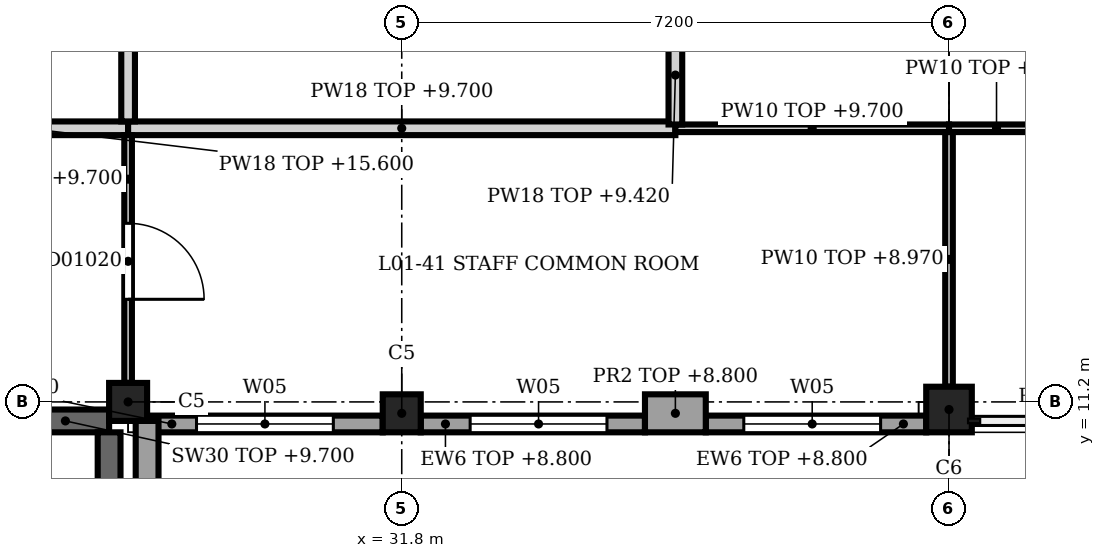
"""IFC4 building model, lengths in metres.
Left out: names, types, materials, properties, quantities, classifications, styles, units other than length and angle.
Written with IfcOpenShell. Run it as: python <this file> out.ifc"""

import sys

from ifc_helpers import new_model, si_unit, direction, frame, frame_2d, origin, origin_2d, place, context, subcontext, project, spatial, rectangle, extrude, element, fill, save


model = new_model("IFC4")
c1 = context("Model", 3, precision=1e-05, world=origin(), true_north=direction((0.0, 1.0)))
c2 = subcontext(c1, "Body", "Model", "MODEL_VIEW")
j1 = project(units=[si_unit("LENGTHUNIT", "METRE"), si_unit("PLANEANGLEUNIT", "RADIAN")], contexts=[c1])
p1 = place(None, origin())
s1 = spatial("IfcSite", under=j1, at=p1, CompositionType="ELEMENT")
p2 = place(p1, origin())
s2 = spatial("IfcBuilding", under=s1, at=p2, CompositionType="ELEMENT")
p3 = place(p2, frame((0.0, 0.0, 5.4)))
s3 = spatial("IfcBuildingStorey", under=s2, at=p3, CompositionType="ELEMENT", Elevation=5.4)
p4 = place(p3, frame((39.0, 11.1, 0.0), z_axis=(0.0, 0.0, 1.0), x_axis=(1.0, 0.0, 0.0)))
e1 = element("IfcColumn", 1, at=p4, inside=s3, PredefinedType="COLUMN", context=c2, shape_type="SweptSolid", body=[
    extrude(rectangle(XDim=0.6, YDim=0.6, at=origin_2d()), origin(), (0.0, 0.0, 1.0), 4.5),
])
for number, where, z_axis, x_axis in (
    (2, (28.2, 11.2, 0.0), (0.0, 0.0, 1.0), (1.0, 0.0, 0.0)),
    (3, (31.8, 11.05, 0.0), (0.0, 0.0, 1.0), (1.0, 0.0, 0.0)),
):
    element("IfcColumn", number, at=place(p3, frame(where, z_axis=z_axis, x_axis=x_axis)), inside=s3, PredefinedType="COLUMN", context=c2, shape_type="SweptSolid", body=[
        extrude(rectangle(XDim=0.5, YDim=0.5, at=origin_2d()), origin(), (0.0, 0.0, 1.0), 4.5),
    ])
p5 = place(p3, frame((28.45, 10.95, 0.0), z_axis=(0.0, 0.0, 1.0), x_axis=(0.0, -1.0, 0.0)))
e4 = element("IfcWall", 4, at=p5, inside=s3, PredefinedType="SOLIDWALL", context=c2, shape_type="SweptSolid", body=[
    extrude(rectangle(XDim=6.95, YDim=0.3, at=frame_2d((3.475, 0.0))), origin(), (0.0, 0.0, 1.0), 4.5),
])
p6 = place(p3, frame((35.8, 11.05, 0.0), z_axis=(0.0, 0.0, 1.0), x_axis=(-1.0, 0.0, 0.0)))
e5 = element("IfcWall", 5, at=p6, inside=s3, PredefinedType="SOLIDWALL", context=c2, shape_type="SweptSolid", body=[
    extrude(rectangle(XDim=0.8, YDim=0.5, at=frame_2d((0.4, 0.0))), origin(), (0.0, 0.0, 1.0), 3.4),
])
p7 = place(p3, frame((38.7, 10.91, 0.0), z_axis=(0.0, 0.0, 1.0), x_axis=(-1.0, 0.0, 0.0)))
e6 = element("IfcWall", 6, at=p7, inside=s3, PredefinedType="SOLIDWALL", context=c2, shape_type="SweptSolid", body=[
    extrude(rectangle(XDim=2.9, YDim=0.22, at=frame_2d((1.45, 0.0))), origin(), (0.0, 0.0, 1.0), 3.4),
])
p8 = place(p7, frame((0.6, 0.0, 0.9)))
e7 = element("IfcOpeningElement", 7, at=p8, cuts=e6, PredefinedType="OPENING", context=c2, shape_type="SweptSolid", body=[
    extrude(rectangle(XDim=1.8, YDim=2.4, at=frame_2d((0.9, 1.2))), frame((0.0, 0.12, 0.0), z_axis=(0.0, -1.0, 0.0), x_axis=(1.0, 0.0, 0.0)), (0.0, 0.0, 1.0), 0.24),
])
p9 = place(p3, frame((35.0, 10.91, 0.0), z_axis=(0.0, 0.0, 1.0), x_axis=(-1.0, 0.0, 0.0)))
e8 = element("IfcWall", 8, at=p9, inside=s3, PredefinedType="SOLIDWALL", context=c2, shape_type="SweptSolid", body=[
    extrude(rectangle(XDim=2.95, YDim=0.22, at=frame_2d((1.475, 0.0))), origin(), (0.0, 0.0, 1.0), 3.4),
])
p10 = place(p9, frame((0.5, 0.0, 0.9)))
e9 = element("IfcOpeningElement", 9, at=p10, cuts=e8, PredefinedType="OPENING", context=c2, shape_type="SweptSolid", body=[
    extrude(rectangle(XDim=1.8, YDim=2.4, at=frame_2d((0.9, 1.2))), frame((0.0, 0.12, 0.0), z_axis=(0.0, -1.0, 0.0), x_axis=(1.0, 0.0, 0.0)), (0.0, 0.0, 1.0), 0.24),
])
p11 = place(p3, frame((31.55, 10.91, 0.0), z_axis=(0.0, 0.0, 1.0), x_axis=(-1.0, 0.0, 0.0)))
e10 = element("IfcWall", 10, at=p11, inside=s3, PredefinedType="SOLIDWALL", context=c2, shape_type="SweptSolid", body=[
    extrude(rectangle(XDim=3.1, YDim=0.22, at=frame_2d((1.55, 0.0))), origin(), (0.0, 0.0, 1.0), 3.4),
])
p12 = place(p11, frame((0.65, 0.0, 0.9)))
e11 = element("IfcOpeningElement", 11, at=p12, cuts=e10, PredefinedType="OPENING", context=c2, shape_type="SweptSolid", body=[
    extrude(rectangle(XDim=1.8, YDim=2.4, at=frame_2d((0.9, 1.2))), frame((0.0, 0.12, 0.0), z_axis=(0.0, -1.0, 0.0), x_axis=(1.0, 0.0, 0.0)), (0.0, 0.0, 1.0), 0.24),
])
p13 = place(p3, frame((27.95, 10.95, 0.0), z_axis=(0.0, 0.0, 1.0), x_axis=(-1.0, 0.0, 0.0)))
e12 = element("IfcWall", 12, at=p13, inside=s3, PredefinedType="SHEAR", context=c2, shape_type="SweptSolid", body=[
    extrude(rectangle(XDim=3.0, YDim=0.3, at=frame_2d((1.5, 0.0))), origin(), (0.0, 0.0, 1.0), 4.3),
])
p14 = place(p13, frame((1.15, 0.0, 0.0)))
e13 = element("IfcOpeningElement", 13, at=p14, cuts=e12, PredefinedType="OPENING", context=c2, shape_type="SweptSolid", body=[
    extrude(rectangle(XDim=1.2, YDim=2.1, at=frame_2d((0.6, 1.05))), frame((0.0, 0.16, 0.0), z_axis=(0.0, -1.0, 0.0), x_axis=(1.0, 0.0, 0.0)), (0.0, 0.0, 1.0), 0.32),
])
p15 = place(p3, frame((27.95, 4.4, 0.0), z_axis=(0.0, 0.0, 1.0), x_axis=(0.0, 1.0, 0.0)))
e14 = element("IfcWall", 14, at=p15, inside=s3, PredefinedType="SHEAR", context=c2, shape_type="SweptSolid", body=[
    extrude(rectangle(XDim=6.4, YDim=0.3, at=frame_2d((3.2, 0.0))), origin(), (0.0, 0.0, 1.0), 4.3),
])
p16 = place(p3, frame((28.2, 14.8, 0.0), z_axis=(0.0, 0.0, 1.0), x_axis=(-1.0, 0.0, 0.0)))
e15 = element("IfcWall", 15, at=p16, inside=s3, PredefinedType="PARTITIONING", context=c2, shape_type="SweptSolid", body=[
    extrude(rectangle(XDim=7.2, YDim=0.18, at=frame_2d((3.6, 0.0))), origin(), (0.0, 0.0, 1.0), 10.2),
])
p17 = place(p16, frame((2.65, 0.0, 0.0)))
e16 = element("IfcOpeningElement", 16, at=p17, cuts=e15, PredefinedType="OPENING", context=c2, shape_type="SweptSolid", body=[
    extrude(rectangle(XDim=2.0, YDim=2.3, at=frame_2d((1.0, 1.15))), frame((0.0, 0.1, 0.0), z_axis=(0.0, -1.0, 0.0), x_axis=(1.0, 0.0, 0.0)), (0.0, 0.0, 1.0), 0.2),
])
p18 = place(p3, frame((28.2, 14.8, 0.0), z_axis=(0.0, 0.0, 1.0), x_axis=(1.0, 0.0, 0.0)))
e17 = element("IfcWall", 17, at=p18, inside=s3, PredefinedType="PARTITIONING", context=c2, shape_type="SweptSolid", body=[
    extrude(rectangle(XDim=7.2, YDim=0.18, at=frame_2d((3.6, 0.0))), origin(), (0.0, 0.0, 1.0), 4.3),
])
p19 = place(p3, frame((35.4, 14.8, 0.0), z_axis=(0.0, 0.0, 1.0), x_axis=(1.0, 0.0, 0.0)))
e18 = element("IfcWall", 18, at=p19, inside=s3, PredefinedType="PARTITIONING", context=c2, shape_type="SweptSolid", body=[
    extrude(rectangle(XDim=3.6, YDim=0.1, at=frame_2d((1.8, 0.0))), origin(), (0.0, 0.0, 1.0), 4.3),
])
p20 = place(p3, frame((41.975, 14.8, 0.0), z_axis=(0.0, 0.0, 1.0), x_axis=(-1.0, 0.0, 0.0)))
e19 = element("IfcWall", 19, at=p20, inside=s3, PredefinedType="PARTITIONING", context=c2, shape_type="SweptSolid", body=[
    extrude(rectangle(XDim=2.975, YDim=0.1, at=frame_2d((1.488, 0.0))), origin(), (0.0, 0.0, 1.0), 4.3),
])
p21 = place(p20, frame((0.725, 0.0, 0.0)))
e20 = element("IfcOpeningElement", 20, at=p21, cuts=e19, PredefinedType="OPENING", context=c2, shape_type="SweptSolid", body=[
    extrude(rectangle(XDim=1.0, YDim=2.1, at=frame_2d((0.5, 1.05))), frame((0.0, 0.06, 0.0), z_axis=(0.0, -1.0, 0.0), x_axis=(1.0, 0.0, 0.0)), (0.0, 0.0, 1.0), 0.12),
])
p22 = place(p3, frame((28.2, 14.71, 0.0), z_axis=(0.0, 0.0, 1.0), x_axis=(0.0, -1.0, 0.0)))
e21 = element("IfcWall", 21, at=p22, inside=s3, PredefinedType="PARTITIONING", context=c2, shape_type="SweptSolid", body=[
    extrude(rectangle(XDim=3.26, YDim=0.1, at=frame_2d((1.63, 0.0))), origin(), (0.0, 0.0, 1.0), 4.3),
])
p23 = place(p22, frame((1.16, 0.0, 0.0)))
e22 = element("IfcOpeningElement", 22, at=p23, cuts=e21, PredefinedType="OPENING", context=c2, shape_type="SweptSolid", body=[
    extrude(rectangle(XDim=1.0, YDim=2.1, at=frame_2d((0.5, 1.05))), frame((0.0, 0.06, 0.0), z_axis=(0.0, -1.0, 0.0), x_axis=(1.0, 0.0, 0.0)), (0.0, 0.0, 1.0), 0.12),
])
p24 = place(p3, frame((28.2, 14.89, 0.0), z_axis=(0.0, 0.0, 1.0), x_axis=(0.0, 1.0, 0.0)))
e23 = element("IfcWall", 23, at=p24, inside=s3, PredefinedType="PARTITIONING", context=c2, shape_type="SweptSolid", body=[
    extrude(rectangle(XDim=3.26, YDim=0.18, at=frame_2d((1.63, 0.0))), origin(), (0.0, 0.0, 1.0), 4.3),
])
p25 = place(p3, frame((35.4, 14.85, 0.0), z_axis=(0.0, 0.0, 1.0), x_axis=(0.0, 1.0, 0.0)))
e24 = element("IfcWall", 24, at=p25, inside=s3, PredefinedType="PARTITIONING", context=c2, shape_type="SweptSolid", body=[
    extrude(rectangle(XDim=3.46, YDim=0.18, at=frame_2d((1.73, 0.0))), origin(), (0.0, 0.0, 1.0), 4.02),
])
p26 = place(p25, frame((1.3, 0.0, 0.0)))
e25 = element("IfcOpeningElement", 25, at=p26, cuts=e24, PredefinedType="OPENING", context=c2, shape_type="SweptSolid", body=[
    extrude(rectangle(XDim=1.0, YDim=2.1, at=frame_2d((0.5, 1.05))), frame((0.0, 0.1, 0.0), z_axis=(0.0, -1.0, 0.0), x_axis=(1.0, 0.0, 0.0)), (0.0, 0.0, 1.0), 0.2),
])
p27 = place(p3, frame((39.0, 11.4, 0.0), z_axis=(0.0, 0.0, 1.0), x_axis=(0.0, 1.0, 0.0)))
e26 = element("IfcWall", 26, at=p27, inside=s3, PredefinedType="PARTITIONING", context=c2, shape_type="SweptSolid", body=[
    extrude(rectangle(XDim=3.35, YDim=0.1, at=frame_2d((1.675, 0.0))), origin(), (0.0, 0.0, 1.0), 3.57),
])
p28 = place(p8, origin())
e27 = element("IfcWindow", 27, at=p28, inside=s3, PartitioningType="SINGLE_PANEL", PredefinedType="WINDOW", context=c2, shape_type="SweptSolid", body=[
    extrude(rectangle(XDim=1.8, YDim=2.4, at=frame_2d((0.9, 1.2))), frame((0.0, 0.03, 0.0), z_axis=(0.0, -1.0, 0.0), x_axis=(1.0, 0.0, 0.0)), (0.0, 0.0, 1.0), 0.06),
])
fill(e7, e27)
p29 = place(p10, origin())
e28 = element("IfcWindow", 28, at=p29, inside=s3, PartitioningType="SINGLE_PANEL", PredefinedType="WINDOW", context=c2, shape_type="SweptSolid", body=[
    extrude(rectangle(XDim=1.8, YDim=2.4, at=frame_2d((0.9, 1.2))), frame((0.0, 0.03, 0.0), z_axis=(0.0, -1.0, 0.0), x_axis=(1.0, 0.0, 0.0)), (0.0, 0.0, 1.0), 0.06),
])
fill(e9, e28)
p30 = place(p12, origin())
e29 = element("IfcWindow", 29, at=p30, inside=s3, PartitioningType="SINGLE_PANEL", PredefinedType="WINDOW", context=c2, shape_type="SweptSolid", body=[
    extrude(rectangle(XDim=1.8, YDim=2.4, at=frame_2d((0.9, 1.2))), frame((0.0, 0.03, 0.0), z_axis=(0.0, -1.0, 0.0), x_axis=(1.0, 0.0, 0.0)), (0.0, 0.0, 1.0), 0.06),
])
fill(e11, e29)
p31 = place(p23, origin())
e30 = element("IfcDoor", 30, at=p31, inside=s3, OperationType="SINGLE_SWING_RIGHT", PredefinedType="DOOR", context=c2, shape_type="SweptSolid", body=[
    extrude(rectangle(XDim=1.0, YDim=2.1, at=frame_2d((0.5, 1.05))), frame((0.0, 0.025, 0.0), z_axis=(0.0, -1.0, 0.0), x_axis=(1.0, 0.0, 0.0)), (0.0, 0.0, 1.0), 0.05),
])
fill(e22, e30)
save(model, sys.argv[1])
